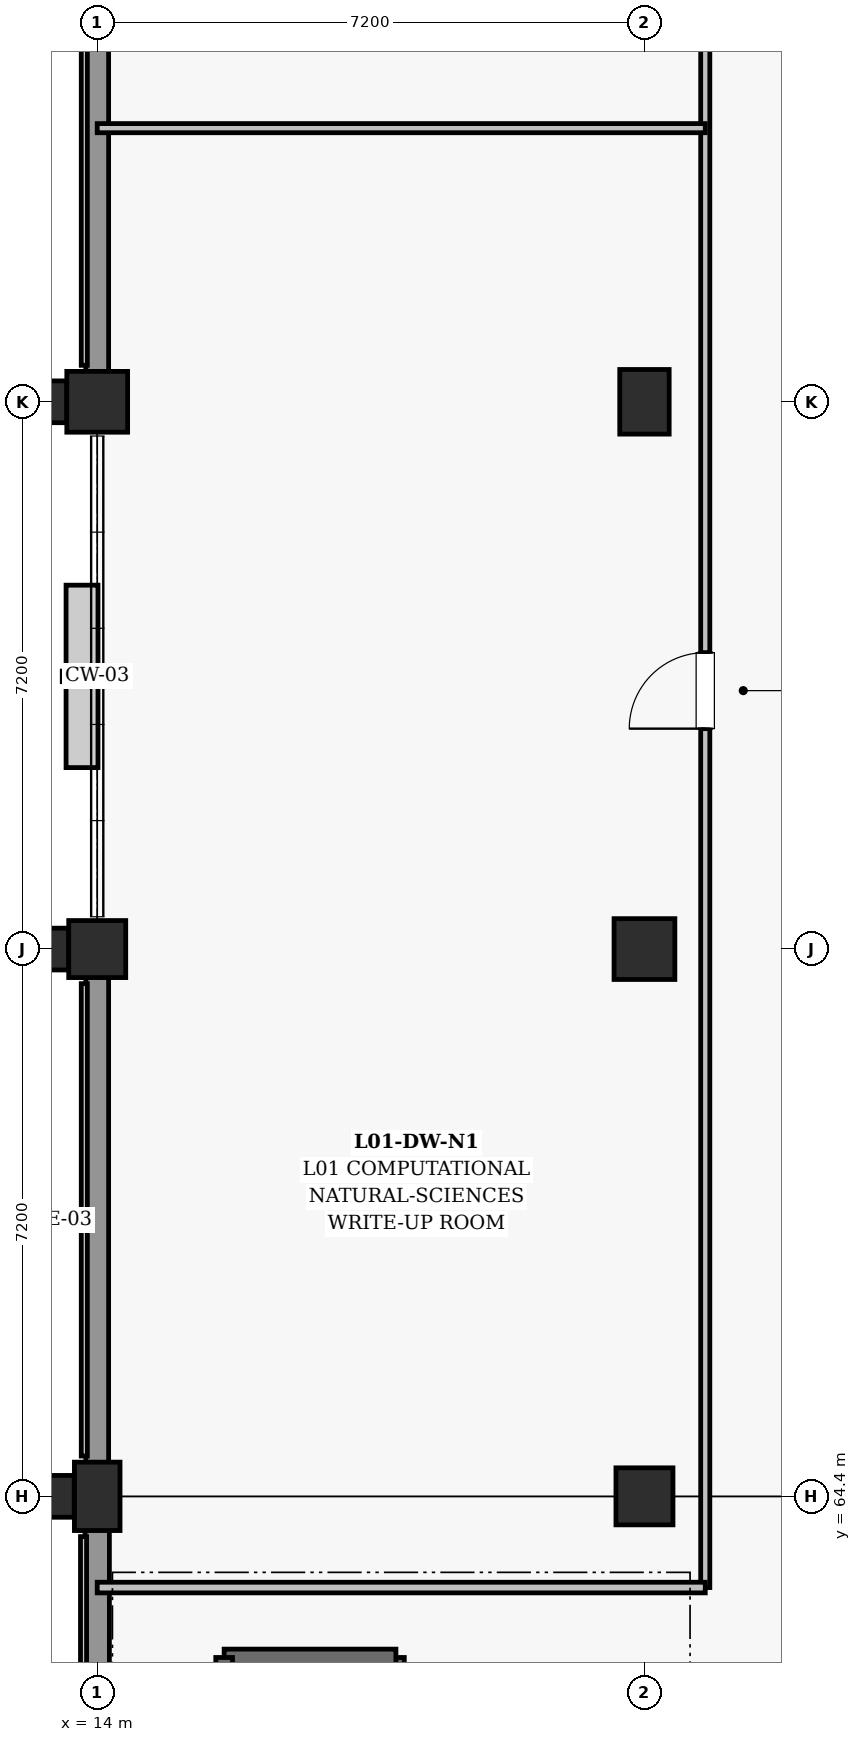
"""IFC4 building model, lengths in metres.
Left out: names, types, materials, properties, quantities, classifications, styles, units other than length and angle.
Written with IfcOpenShell. Run it as: python <this file> out.ifc"""

import sys

from ifc_helpers import new_model, si_unit, direction, frame, frame_2d, origin, origin_2d, place, context, subcontext, project, spatial, rectangle, extrude, element, fill, save


model = new_model("IFC4")
c1 = context("Model", 3, precision=1e-05, world=origin(), true_north=direction((0.0, 1.0)))
c2 = subcontext(c1, "Body", "Model", "MODEL_VIEW")
j1 = project(units=[si_unit("LENGTHUNIT", "METRE"), si_unit("PLANEANGLEUNIT", "RADIAN")], contexts=[c1])
p1 = place(None, origin())
s1 = spatial("IfcSite", under=j1, at=p1, CompositionType="ELEMENT")
p2 = place(p1, origin())
s2 = spatial("IfcBuilding", under=s1, at=p2, CompositionType="ELEMENT")
p3 = place(p2, frame((0.0, 0.0, 5.4)))
s3 = spatial("IfcBuildingStorey", under=s2, at=p3, CompositionType="ELEMENT", Elevation=5.4)
p4 = place(p3, frame((14.0, 64.4, 0.0), z_axis=(0.0, 0.0, 1.0), x_axis=(1.0, 0.0, 0.0)))
e1 = element("IfcColumn", 1, at=p4, inside=s3, PredefinedType="COLUMN", context=c2, shape_type="SweptSolid", body=[
    extrude(rectangle(XDim=0.6, YDim=0.9, at=origin_2d()), origin(), (0.0, 0.0, 1.0), 4.5),
])
p5 = place(p3, frame((14.0, 71.6, 0.0), z_axis=(0.0, 0.0, 1.0), x_axis=(1.0, 0.0, 0.0)))
e2 = element("IfcColumn", 2, at=p5, inside=s3, PredefinedType="COLUMN", context=c2, shape_type="SweptSolid", body=[
    extrude(rectangle(XDim=0.75, YDim=0.75, at=origin_2d()), origin(), (0.0, 0.0, 1.0), 4.5),
])
p6 = place(p3, frame((14.0, 78.8, 0.0), z_axis=(0.0, 0.0, 1.0), x_axis=(1.0, 0.0, 0.0)))
e3 = element("IfcColumn", 3, at=p6, inside=s3, PredefinedType="COLUMN", context=c2, shape_type="SweptSolid", body=[
    extrude(rectangle(XDim=0.8, YDim=0.8, at=origin_2d()), origin(), (0.0, 0.0, 1.0), 4.5),
])
p7 = place(p3, frame((21.2, 64.4, 0.0), z_axis=(0.0, 0.0, 1.0), x_axis=(1.0, 0.0, 0.0)))
e4 = element("IfcColumn", 4, at=p7, inside=s3, PredefinedType="COLUMN", context=c2, shape_type="SweptSolid", body=[
    extrude(rectangle(XDim=0.75, YDim=0.75, at=origin_2d()), origin(), (0.0, 0.0, 1.0), 4.5),
])
p8 = place(p3, frame((21.2, 71.6, 0.0), z_axis=(0.0, 0.0, 1.0), x_axis=(1.0, 0.0, 0.0)))
e5 = element("IfcColumn", 5, at=p8, inside=s3, PredefinedType="COLUMN", context=c2, shape_type="SweptSolid", body=[
    extrude(rectangle(XDim=0.8, YDim=0.8, at=origin_2d()), origin(), (0.0, 0.0, 1.0), 4.5),
])
p9 = place(p3, frame((21.2, 78.8, 0.0), z_axis=(0.0, 0.0, 1.0), x_axis=(1.0, 0.0, 0.0)))
e6 = element("IfcColumn", 6, at=p9, inside=s3, PredefinedType="COLUMN", context=c2, shape_type="SweptSolid", body=[
    extrude(rectangle(XDim=0.65, YDim=0.85, at=origin_2d()), origin(), (0.0, 0.0, 1.0), 4.5),
])
for number, where, z_axis, x_axis in (
    (7, (13.297, 64.4, 0.0), (0.0, 0.0, 1.0), (0.0, 1.0, 0.0)),
    (8, (13.222, 71.6, 0.0), (0.0, 0.0, 1.0), (0.0, 1.0, 0.0)),
    (9, (13.197, 78.8, 0.0), (0.0, 0.0, 1.0), (0.0, 1.0, 0.0)),
):
    element("IfcColumn", number, at=place(p3, frame(where, z_axis=z_axis, x_axis=x_axis)), inside=s3, PredefinedType="PILASTER", context=c2, shape_type="SweptSolid", body=[
        extrude(rectangle(XDim=0.55, YDim=0.8, at=origin_2d()), origin(), (0.0, 0.0, 1.0), 4.5),
    ])
p10 = place(p3, frame((14.0, 57.605, 0.0), z_axis=(0.0, 0.0, 1.0), x_axis=(0.0, 1.0, 0.0)))
e10 = element("IfcWall", 10, at=p10, inside=s3, PredefinedType="SOLIDWALL", context=c2, shape_type="SweptSolid", body=[
    extrude(rectangle(XDim=6.365, YDim=0.32, at=frame_2d((3.183, 0.0))), origin(), (0.0, 0.0, 1.0), 3.455),
])
p11 = place(p3, frame((14.0, 64.83, 0.0), z_axis=(0.0, 0.0, 1.0), x_axis=(0.0, 1.0, 0.0)))
e11 = element("IfcWall", 11, at=p11, inside=s3, PredefinedType="SOLIDWALL", context=c2, shape_type="SweptSolid", body=[
    extrude(rectangle(XDim=6.415, YDim=0.3, at=frame_2d((3.208, 0.0))), origin(), (0.0, 0.0, 1.0), 3.425),
])
p12 = place(p3, frame((14.0, 79.18, 0.0), z_axis=(0.0, 0.0, 1.0), x_axis=(0.0, 1.0, 0.0)))
e12 = element("IfcWall", 12, at=p12, inside=s3, PredefinedType="SOLIDWALL", context=c2, shape_type="SweptSolid", body=[
    extrude(rectangle(XDim=6.44, YDim=0.3, at=frame_2d((3.22, 0.0))), origin(), (0.0, 0.0, 1.0), 3.375),
])
p13 = place(p3, frame((17.93, 59.72, 0.0), z_axis=(0.0, 0.0, 1.0), x_axis=(0.0, 1.0, 0.0)))
e13 = element("IfcWall", 13, at=p13, inside=s3, PredefinedType="SHEAR", context=c2, shape_type="SweptSolid", body=[
    extrude(rectangle(XDim=2.56, YDim=0.22, at=frame_2d((1.28, 0.0))), origin(), (0.0, 0.0, 1.0), 4.195),
])
p14 = place(p13, frame((0.73, 0.0, 0.0)))
e14 = element("IfcOpeningElement", 14, at=p14, cuts=e13, PredefinedType="OPENING", context=c2, shape_type="SweptSolid", body=[
    extrude(rectangle(XDim=1.1, YDim=2.15, at=frame_2d((0.55, 1.075))), frame((0.0, 0.12, 0.0), z_axis=(0.0, -1.0, 0.0), x_axis=(1.0, 0.0, 0.0)), (0.0, 0.0, 1.0), 0.24),
])
p15 = place(p3, frame((17.93, 62.28, 0.0), z_axis=(0.0, 0.0, 1.0), x_axis=(-1.0, 0.0, 0.0)))
e15 = element("IfcWall", 15, at=p15, inside=s3, PredefinedType="SHEAR", context=c2, shape_type="SweptSolid", body=[
    extrude(rectangle(XDim=2.26, YDim=0.22, at=frame_2d((1.13, 0.0))), origin(), (0.0, 0.0, 1.0), 4.195),
])
p16 = place(p3, frame((15.67, 62.28, 0.0), z_axis=(0.0, 0.0, 1.0), x_axis=(0.0, -1.0, 0.0)))
e16 = element("IfcWall", 16, at=p16, inside=s3, PredefinedType="SHEAR", context=c2, shape_type="SweptSolid", body=[
    extrude(rectangle(XDim=2.56, YDim=0.22, at=frame_2d((1.28, 0.0))), origin(), (0.0, 0.0, 1.0), 4.195),
])
p17 = place(p3, frame((22.0, 63.2, 0.0), z_axis=(0.0, 0.0, 1.0), x_axis=(0.0, 1.0, 0.0)))
e17 = element("IfcWall", 17, at=p17, inside=s3, PredefinedType="PARTITIONING", context=c2, shape_type="SweptSolid", body=[
    extrude(rectangle(XDim=39.6, YDim=0.12, at=frame_2d((19.8, 0.0))), origin(), (0.0, 0.0, 1.0), 3.38),
])
p18 = place(p17, frame((11.3, 0.0, 0.0)))
e18 = element("IfcOpeningElement", 18, at=p18, cuts=e17, PredefinedType="OPENING", context=c2, shape_type="SweptSolid", body=[
    extrude(rectangle(XDim=1.0, YDim=2.15, at=frame_2d((0.5, 1.075))), frame((0.0, 0.07, 0.0), z_axis=(0.0, -1.0, 0.0), x_axis=(1.0, 0.0, 0.0)), (0.0, 0.0, 1.0), 0.14),
])
p19 = place(p17, frame((26.3, 0.0, 0.0)))
e19 = element("IfcOpeningElement", 19, at=p19, cuts=e17, PredefinedType="OPENING", context=c2, shape_type="SweptSolid", body=[
    extrude(rectangle(XDim=1.1, YDim=2.15, at=frame_2d((0.55, 1.075))), frame((0.0, 0.07, 0.0), z_axis=(0.0, -1.0, 0.0), x_axis=(1.0, 0.0, 0.0)), (0.0, 0.0, 1.0), 0.14),
])
p20 = place(p3, frame((14.0, 63.2, 0.0), z_axis=(0.0, 0.0, 1.0), x_axis=(1.0, 0.0, 0.0)))
e20 = element("IfcWall", 20, at=p20, inside=s3, PredefinedType="PARTITIONING", context=c2, shape_type="SweptSolid", body=[
    extrude(rectangle(XDim=8.0, YDim=0.14, at=frame_2d((4.0, 0.0))), origin(), (0.0, 0.0, 1.0), 3.58),
])
p21 = place(p3, frame((14.0, 82.4, 0.0), z_axis=(0.0, 0.0, 1.0), x_axis=(1.0, 0.0, 0.0)))
e21 = element("IfcWall", 21, at=p21, inside=s3, PredefinedType="PARTITIONING", context=c2, shape_type="SweptSolid", body=[
    extrude(rectangle(XDim=8.0, YDim=0.12, at=frame_2d((4.0, 0.0))), origin(), (0.0, 0.0, 1.0), 3.58),
])
p22 = place(p18, origin())
e22 = element("IfcDoor", 22, at=p22, inside=s3, OperationType="SINGLE_SWING_LEFT", PredefinedType="DOOR", context=c2, shape_type="SweptSolid", body=[
    extrude(rectangle(XDim=1.0, YDim=2.15, at=frame_2d((0.5, 1.075))), frame((0.0, 0.025, 0.0), z_axis=(0.0, -1.0, 0.0), x_axis=(1.0, 0.0, 0.0)), (0.0, 0.0, 1.0), 0.05),
])
fill(e18, e22)
save(model, sys.argv[1])
